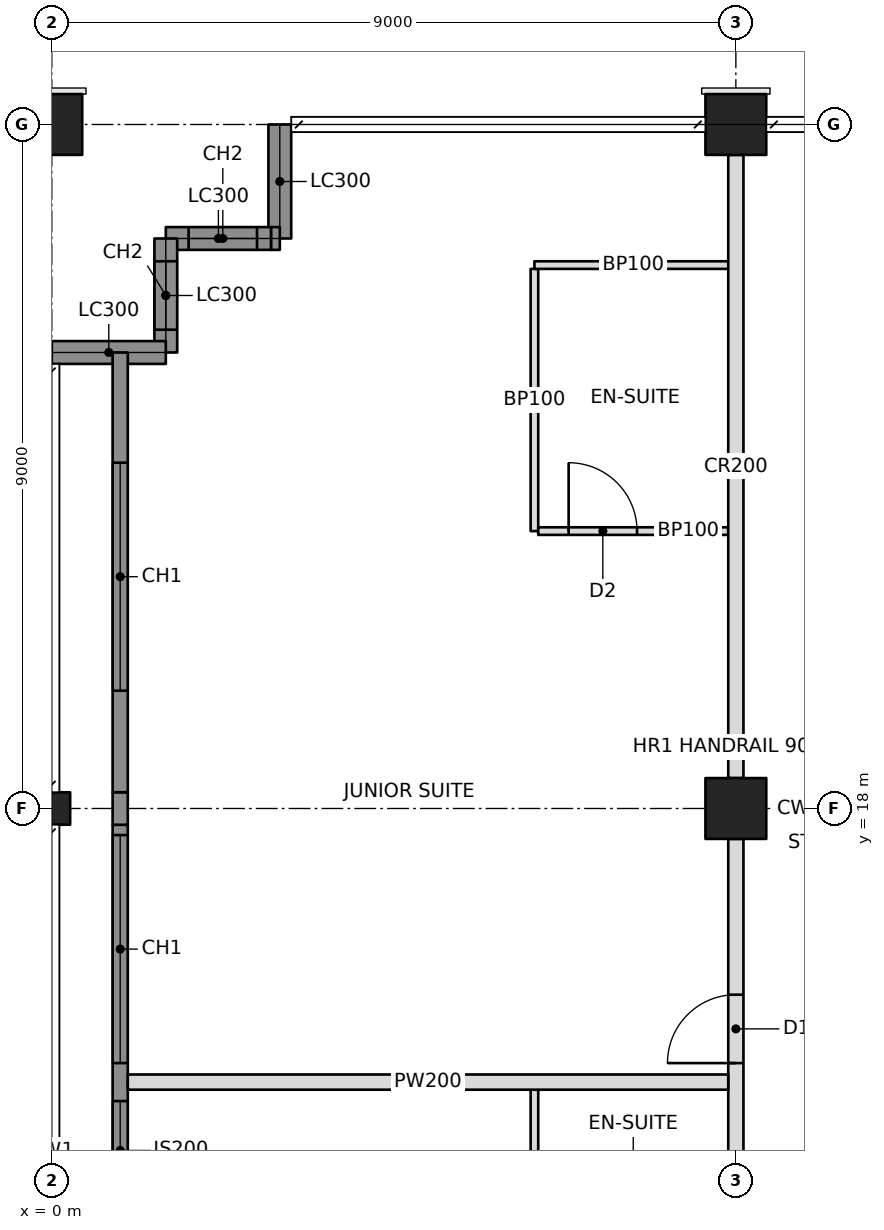
"""IFC4 building model, lengths in metres.
Left out: names, types, materials, properties, quantities, classifications, styles, units other than length and angle.
Written with IfcOpenShell. Run it as: python <this file> out.ifc"""

import sys

from ifc_helpers import new_model, si_unit, direction, frame, frame_2d, origin, origin_2d, place, context, subcontext, project, spatial, rectangle, hollow_rectangle, i_section, extrude, element, fill, save


model = new_model("IFC4")
c1 = context("Model", 3, precision=1e-05, world=origin(), true_north=direction((0.0, 1.0)))
c2 = subcontext(c1, "Body", "Model", "MODEL_VIEW")
j1 = project(units=[si_unit("LENGTHUNIT", "METRE"), si_unit("PLANEANGLEUNIT", "RADIAN")], contexts=[c1])
p1 = place(None, origin())
s1 = spatial("IfcSite", under=j1, at=p1, CompositionType="ELEMENT")
p2 = place(p1, origin())
s2 = spatial("IfcBuilding", under=s1, at=p2, CompositionType="ELEMENT")
p3 = place(p2, frame((0.0, 0.0, 218.2)))
s3 = spatial("IfcBuildingStorey", under=s2, at=p3, CompositionType="ELEMENT", Elevation=218.2)
p4 = place(p3, frame((0.0, 18.0, 0.0), z_axis=(0.0, 0.0, 1.0), x_axis=(0.0, 1.0, 0.0)))
e1 = element("IfcColumn", 1, at=p4, inside=s3, PredefinedType="COLUMN", context=c2, shape_type="SweptSolid", body=[
    extrude(i_section(OverallWidth=0.427, OverallDepth=0.483, WebThickness=0.051, FlangeThickness=0.082, at=origin_2d()), origin(), (0.0, 0.0, 1.0), 3.4),
])
p5 = place(p3, frame((0.0, 27.0, 0.0), z_axis=(0.0, 0.0, 1.0), x_axis=(0.0, 1.0, 0.0)))
e2 = element("IfcColumn", 2, at=p5, inside=s3, PredefinedType="COLUMN", context=c2, shape_type="SweptSolid", body=[
    extrude(hollow_rectangle(XDim=0.8, YDim=0.8, WallThickness=0.06, at=origin_2d()), origin(), (0.0, 0.0, 1.0), 3.4),
])
p6 = place(p3, frame((9.0, 18.0, 0.0), z_axis=(0.0, 0.0, 1.0), x_axis=(1.0, 0.0, 0.0)))
e3 = element("IfcColumn", 3, at=p6, inside=s3, PredefinedType="COLUMN", context=c2, shape_type="SweptSolid", body=[
    extrude(hollow_rectangle(XDim=0.8, YDim=0.8, WallThickness=0.1, at=origin_2d()), origin(), (0.0, 0.0, 1.0), 3.4),
])
p7 = place(p3, frame((9.0, 27.0, 0.0), z_axis=(0.0, 0.0, 1.0), x_axis=(1.0, 0.0, 0.0)))
e4 = element("IfcColumn", 4, at=p7, inside=s3, PredefinedType="COLUMN", context=c2, shape_type="SweptSolid", body=[
    extrude(hollow_rectangle(XDim=0.8, YDim=0.8, WallThickness=0.06, at=origin_2d()), origin(), (0.0, 0.0, 1.0), 3.4),
])
p8 = place(p3, frame((3.0, 27.0, 0.0), z_axis=(0.0, 0.0, 1.0), x_axis=(0.0, -1.0, 0.0)))
e5 = element("IfcWall", 5, at=p8, inside=s3, PredefinedType="SOLIDWALL", context=c2, shape_type="SweptSolid", body=[
    extrude(rectangle(XDim=1.5, YDim=0.3, at=frame_2d((0.75, 0.0))), origin(), (0.0, 0.0, 1.0), 2.202),
])
p9 = place(p3, frame((3.0, 25.5, 0.0), z_axis=(0.0, 0.0, 1.0), x_axis=(-1.0, 0.0, 0.0)))
e6 = element("IfcWall", 6, at=p9, inside=s3, PredefinedType="SOLIDWALL", context=c2, shape_type="SweptSolid", body=[
    extrude(rectangle(XDim=0.116, YDim=0.3, at=frame_2d((0.058, 0.0))), origin(), (0.0, 0.0, 1.0), 2.542),
])
p10 = place(p3, frame((1.5, 25.5, 0.0), z_axis=(0.0, 0.0, 1.0), x_axis=(0.0, -1.0, 0.0)))
e7 = element("IfcWall", 7, at=p10, inside=s3, PredefinedType="SOLIDWALL", context=c2, shape_type="SweptSolid", body=[
    extrude(rectangle(XDim=1.5, YDim=0.3, at=frame_2d((0.75, 0.0))), origin(), (0.0, 0.0, 1.0), 3.15),
])
p11 = place(p10, frame((0.3, 0.0, 0.6)))
e8 = element("IfcOpeningElement", 8, at=p11, cuts=e7, PredefinedType="OPENING", context=c2, shape_type="SweptSolid", body=[
    extrude(rectangle(XDim=0.9, YDim=2.2, at=frame_2d((0.45, 1.1))), frame((0.0, 0.16, 0.0), z_axis=(0.0, -1.0, 0.0), x_axis=(1.0, 0.0, 0.0)), (0.0, 0.0, 1.0), 0.32),
])
p12 = place(p3, frame((1.5, 24.0, 0.0), z_axis=(0.0, 0.0, 1.0), x_axis=(-1.0, 0.0, 0.0)))
e9 = element("IfcWall", 9, at=p12, inside=s3, PredefinedType="SOLIDWALL", context=c2, shape_type="SweptSolid", body=[
    extrude(rectangle(XDim=1.5, YDim=0.3, at=frame_2d((0.75, 0.0))), origin(), (0.0, 0.0, 1.0), 2.202),
])
p13 = place(p3, frame((9.0, 10.8, 0.0), z_axis=(0.0, 0.0, 1.0), x_axis=(0.0, 1.0, 0.0)))
e10 = element("IfcWall", 10, at=p13, inside=s3, PredefinedType="PARTITIONING", context=c2, shape_type="SweptSolid", body=[
    extrude(rectangle(XDim=6.8, YDim=0.2, at=frame_2d((3.4, 0.0))), origin(), (0.0, 0.0, 1.0), 2.21),
])
p14 = place(p13, frame((0.25, 0.0, 0.0)))
e11 = element("IfcOpeningElement", 11, at=p14, cuts=e10, PredefinedType="OPENING", context=c2, shape_type="SweptSolid", body=[
    extrude(rectangle(XDim=0.9, YDim=2.1, at=frame_2d((0.45, 1.05))), frame((0.0, 0.11, 0.0), z_axis=(0.0, -1.0, 0.0), x_axis=(1.0, 0.0, 0.0)), (0.0, 0.0, 1.0), 0.22),
])
p15 = place(p13, frame((3.85, 0.0, 0.0)))
e12 = element("IfcOpeningElement", 12, at=p15, cuts=e10, PredefinedType="OPENING", context=c2, shape_type="SweptSolid", body=[
    extrude(rectangle(XDim=0.9, YDim=2.1, at=frame_2d((0.45, 1.05))), frame((0.0, 0.11, 0.0), z_axis=(0.0, -1.0, 0.0), x_axis=(1.0, 0.0, 0.0)), (0.0, 0.0, 1.0), 0.22),
])
p16 = place(p3, frame((9.0, 18.4, 0.0), z_axis=(0.0, 0.0, 1.0), x_axis=(0.0, 1.0, 0.0)))
e13 = element("IfcWall", 13, at=p16, inside=s3, PredefinedType="PARTITIONING", context=c2, shape_type="SweptSolid", body=[
    extrude(rectangle(XDim=8.2, YDim=0.2, at=frame_2d((4.1, 0.0))), origin(), (0.0, 0.0, 1.0), 2.21),
])
p17 = place(p3, frame((8.9, 14.4, 0.0), z_axis=(0.0, 0.0, 1.0), x_axis=(-1.0, 0.0, 0.0)))
e14 = element("IfcWall", 14, at=p17, inside=s3, PredefinedType="PARTITIONING", context=c2, shape_type="SweptSolid", body=[
    extrude(rectangle(XDim=7.9, YDim=0.2, at=frame_2d((3.95, 0.0))), origin(), (0.0, 0.0, 1.0), 2.21),
])
p18 = place(p3, frame((6.35, 12.25, 0.0), z_axis=(0.0, 0.0, 1.0), x_axis=(0.0, 1.0, 0.0)))
e15 = element("IfcWall", 15, at=p18, inside=s3, PredefinedType="PARTITIONING", context=c2, shape_type="SweptSolid", body=[
    extrude(rectangle(XDim=2.05, YDim=0.1, at=frame_2d((1.025, 0.0))), origin(), (0.0, 0.0, 1.0), 3.15),
])
p19 = place(p3, frame((6.35, 21.65, 0.0), z_axis=(0.0, 0.0, 1.0), x_axis=(0.0, 1.0, 0.0)))
e16 = element("IfcWall", 16, at=p19, inside=s3, PredefinedType="PARTITIONING", context=c2, shape_type="SweptSolid", body=[
    extrude(rectangle(XDim=3.45, YDim=0.1, at=frame_2d((1.725, 0.0))), origin(), (0.0, 0.0, 1.0), 3.15),
])
p20 = place(p3, frame((8.9, 21.65, 0.0), z_axis=(0.0, 0.0, 1.0), x_axis=(-1.0, 0.0, 0.0)))
e17 = element("IfcWall", 17, at=p20, inside=s3, PredefinedType="PARTITIONING", context=c2, shape_type="SweptSolid", body=[
    extrude(rectangle(XDim=2.5, YDim=0.1, at=frame_2d((1.25, 0.0))), origin(), (0.0, 0.0, 1.0), 2.21),
])
p21 = place(p20, frame((1.2, 0.0, 0.0)))
e18 = element("IfcOpeningElement", 18, at=p21, cuts=e17, PredefinedType="OPENING", context=c2, shape_type="SweptSolid", body=[
    extrude(rectangle(XDim=0.9, YDim=2.1, at=frame_2d((0.45, 1.05))), frame((0.0, 0.06, 0.0), z_axis=(0.0, -1.0, 0.0), x_axis=(1.0, 0.0, 0.0)), (0.0, 0.0, 1.0), 0.12),
])
p22 = place(p3, frame((6.35, 25.15, 0.0), z_axis=(0.0, 0.0, 1.0), x_axis=(1.0, 0.0, 0.0)))
e19 = element("IfcWall", 19, at=p22, inside=s3, PredefinedType="PARTITIONING", context=c2, shape_type="SweptSolid", body=[
    extrude(rectangle(XDim=2.6, YDim=0.1, at=frame_2d((1.3, 0.0))), origin(), (0.0, 0.0, 1.0), 2.21),
])
p23 = place(p3, frame((2.884, 25.5, 0.0), z_axis=(0.0, 0.0, 1.0), x_axis=(-1.0, 0.0, 0.0)))
e20 = element("IfcWall", 20, at=p23, inside=s3, PredefinedType="SOLIDWALL", context=c2, shape_type="SweptSolid", body=[
    extrude(rectangle(XDim=1.384, YDim=0.3, at=frame_2d((0.692, 0.0))), origin(), (0.0, 0.0, 1.0), 3.15),
])
p24 = place(p23, frame((0.184, 0.0, 0.6)))
e21 = element("IfcOpeningElement", 21, at=p24, cuts=e20, PredefinedType="OPENING", context=c2, shape_type="SweptSolid", body=[
    extrude(rectangle(XDim=0.9, YDim=2.2, at=frame_2d((0.45, 1.1))), frame((0.0, 0.16, 0.0), z_axis=(0.0, -1.0, 0.0), x_axis=(1.0, 0.0, 0.0)), (0.0, 0.0, 1.0), 0.32),
])
p25 = place(p3, frame((0.9, 9.215, 0.0), z_axis=(0.0, 0.0, 1.0), x_axis=(0.0, 1.0, 0.0)))
e22 = element("IfcWall", 22, at=p25, inside=s3, PredefinedType="SOLIDWALL", context=c2, shape_type="SweptSolid", body=[
    extrude(rectangle(XDim=8.571, YDim=0.2, at=frame_2d((4.285, 0.0))), origin(), (0.0, 0.0, 1.0), 3.15),
])
p26 = place(p25, frame((1.935, 0.0, 0.6)))
e23 = element("IfcOpeningElement", 23, at=p26, cuts=e22, PredefinedType="OPENING", context=c2, shape_type="SweptSolid", body=[
    extrude(rectangle(XDim=3.0, YDim=2.2, at=frame_2d((1.5, 1.1))), frame((0.0, 0.11, 0.0), z_axis=(0.0, -1.0, 0.0), x_axis=(1.0, 0.0, 0.0)), (0.0, 0.0, 1.0), 0.22),
])
p27 = place(p25, frame((5.435, 0.0, 0.6)))
e24 = element("IfcOpeningElement", 24, at=p27, cuts=e22, PredefinedType="OPENING", context=c2, shape_type="SweptSolid", body=[
    extrude(rectangle(XDim=3.0, YDim=2.2, at=frame_2d((1.5, 1.1))), frame((0.0, 0.11, 0.0), z_axis=(0.0, -1.0, 0.0), x_axis=(1.0, 0.0, 0.0)), (0.0, 0.0, 1.0), 0.22),
])
p28 = place(p3, frame((0.9, 17.786, 0.0), z_axis=(0.0, 0.0, 1.0), x_axis=(0.0, 1.0, 0.0)))
e25 = element("IfcWall", 25, at=p28, inside=s3, PredefinedType="SOLIDWALL", context=c2, shape_type="SweptSolid", body=[
    extrude(rectangle(XDim=0.428, YDim=0.2, at=frame_2d((0.214, 0.0))), origin(), (0.0, 0.0, 1.0), 2.202),
])
p29 = place(p3, frame((0.9, 18.214, 0.0), z_axis=(0.0, 0.0, 1.0), x_axis=(0.0, 1.0, 0.0)))
e26 = element("IfcWall", 26, at=p29, inside=s3, PredefinedType="SOLIDWALL", context=c2, shape_type="SweptSolid", body=[
    extrude(rectangle(XDim=5.786, YDim=0.2, at=frame_2d((2.893, 0.0))), origin(), (0.0, 0.0, 1.0), 3.15),
])
p30 = place(p29, frame((1.336, 0.0, 0.6)))
e27 = element("IfcOpeningElement", 27, at=p30, cuts=e26, PredefinedType="OPENING", context=c2, shape_type="SweptSolid", body=[
    extrude(rectangle(XDim=3.0, YDim=2.2, at=frame_2d((1.5, 1.1))), frame((0.0, 0.11, 0.0), z_axis=(0.0, -1.0, 0.0), x_axis=(1.0, 0.0, 0.0)), (0.0, 0.0, 1.0), 0.22),
])
p31 = place(p24, origin())
e28 = element("IfcWindow", 28, at=p31, inside=s3, PartitioningType="SINGLE_PANEL", PredefinedType="WINDOW", context=c2, shape_type="SweptSolid", body=[
    extrude(rectangle(XDim=0.9, YDim=2.2, at=frame_2d((0.45, 1.1))), frame((0.0, 0.03, 0.0), z_axis=(0.0, -1.0, 0.0), x_axis=(1.0, 0.0, 0.0)), (0.0, 0.0, 1.0), 0.06),
])
fill(e21, e28)
p32 = place(p11, origin())
e29 = element("IfcWindow", 29, at=p32, inside=s3, PartitioningType="SINGLE_PANEL", PredefinedType="WINDOW", context=c2, shape_type="SweptSolid", body=[
    extrude(rectangle(XDim=0.9, YDim=2.2, at=frame_2d((0.45, 1.1))), frame((0.0, 0.03, 0.0), z_axis=(0.0, -1.0, 0.0), x_axis=(1.0, 0.0, 0.0)), (0.0, 0.0, 1.0), 0.06),
])
fill(e8, e29)
p33 = place(p26, origin())
e30 = element("IfcWindow", 30, at=p33, inside=s3, PartitioningType="TRIPLE_PANEL_VERTICAL", PredefinedType="WINDOW", context=c2, shape_type="SweptSolid", body=[
    extrude(rectangle(XDim=3.0, YDim=2.2, at=frame_2d((1.5, 1.1))), frame((0.0, 0.03, 0.0), z_axis=(0.0, -1.0, 0.0), x_axis=(1.0, 0.0, 0.0)), (0.0, 0.0, 1.0), 0.06),
])
fill(e23, e30)
p34 = place(p27, origin())
e31 = element("IfcWindow", 31, at=p34, inside=s3, PartitioningType="TRIPLE_PANEL_VERTICAL", PredefinedType="WINDOW", context=c2, shape_type="SweptSolid", body=[
    extrude(rectangle(XDim=3.0, YDim=2.2, at=frame_2d((1.5, 1.1))), frame((0.0, 0.03, 0.0), z_axis=(0.0, -1.0, 0.0), x_axis=(1.0, 0.0, 0.0)), (0.0, 0.0, 1.0), 0.06),
])
fill(e24, e31)
p35 = place(p30, origin())
e32 = element("IfcWindow", 32, at=p35, inside=s3, PartitioningType="TRIPLE_PANEL_VERTICAL", PredefinedType="WINDOW", context=c2, shape_type="SweptSolid", body=[
    extrude(rectangle(XDim=3.0, YDim=2.2, at=frame_2d((1.5, 1.1))), frame((0.0, 0.03, 0.0), z_axis=(0.0, -1.0, 0.0), x_axis=(1.0, 0.0, 0.0)), (0.0, 0.0, 1.0), 0.06),
])
fill(e27, e32)
p36 = place(p21, frame((0.9, 0.0, 0.0), z_axis=(0.0, 0.0, 1.0), x_axis=(-1.0, 0.0, 0.0)))
e33 = element("IfcDoor", 33, at=p36, inside=s3, OperationType="SINGLE_SWING_LEFT", PredefinedType="DOOR", context=c2, shape_type="SweptSolid", body=[
    extrude(rectangle(XDim=0.9, YDim=2.1, at=frame_2d((0.45, 1.05))), frame((0.0, 0.025, 0.0), z_axis=(0.0, -1.0, 0.0), x_axis=(1.0, 0.0, 0.0)), (0.0, 0.0, 1.0), 0.05),
])
fill(e18, e33)
p37 = place(p15, origin())
e34 = element("IfcDoor", 34, at=p37, inside=s3, OperationType="SINGLE_SWING_LEFT", PredefinedType="DOOR", context=c2, shape_type="SweptSolid", body=[
    extrude(rectangle(XDim=0.9, YDim=2.1, at=frame_2d((0.45, 1.05))), frame((0.0, 0.025, 0.0), z_axis=(0.0, -1.0, 0.0), x_axis=(1.0, 0.0, 0.0)), (0.0, 0.0, 1.0), 0.05),
])
fill(e12, e34)
save(model, sys.argv[1])
